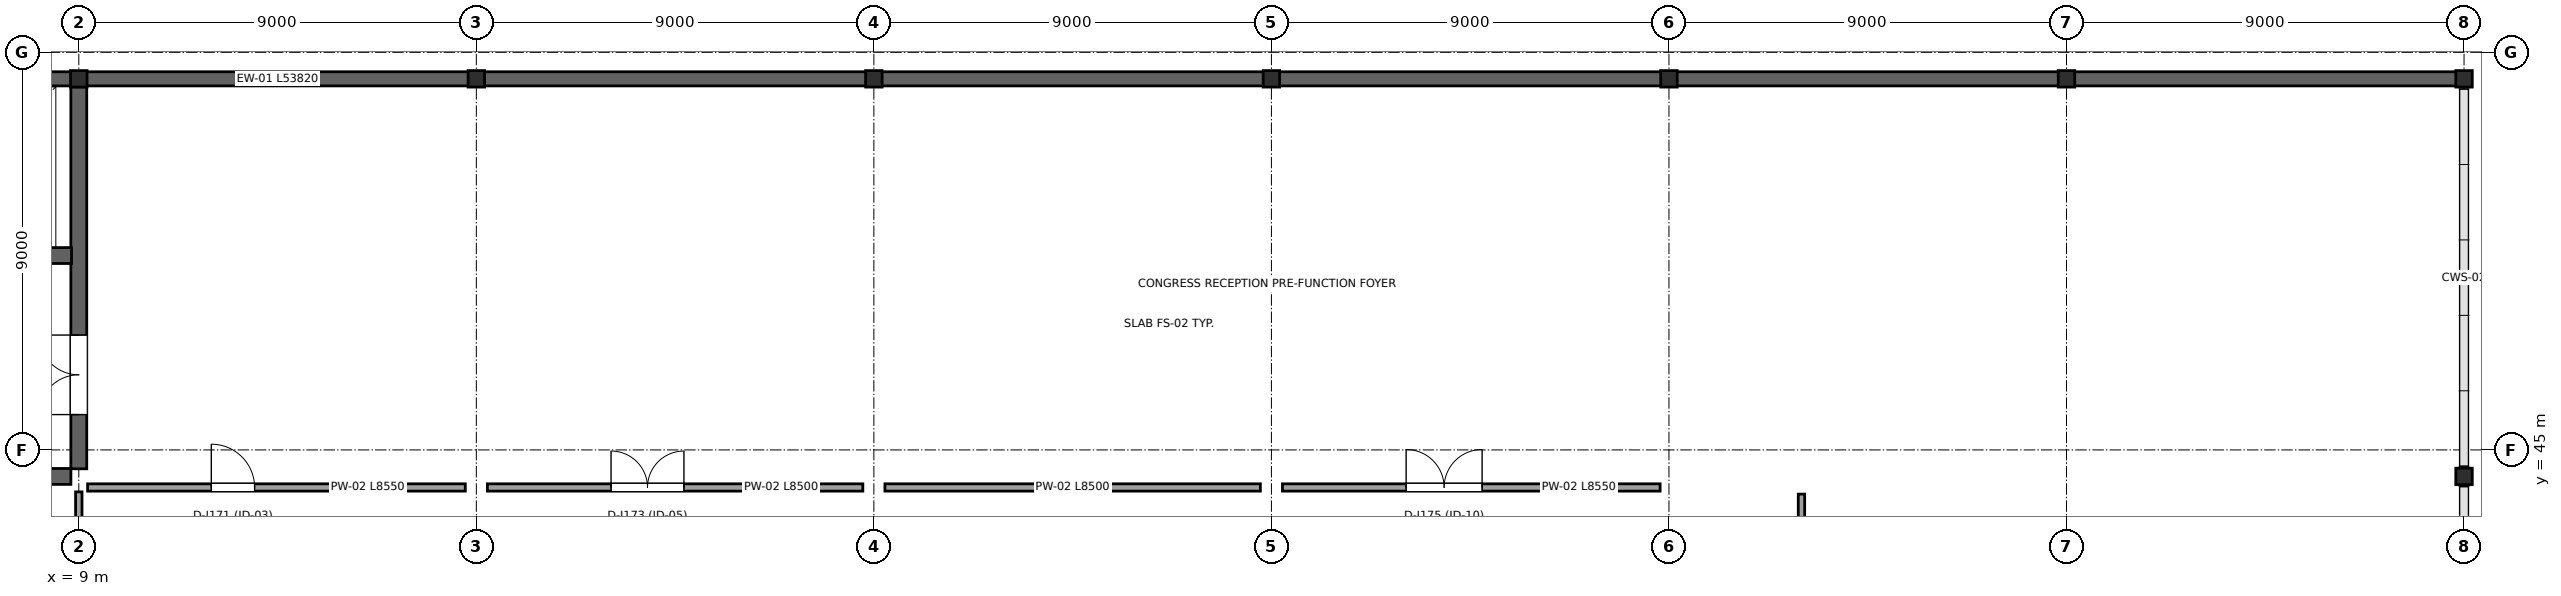
"""IFC4 building model, lengths in metres.
Left out: names, types, materials, properties, quantities, classifications, styles, units other than length and angle.
Written with IfcOpenShell. Run it as: python <this file> out.ifc"""

import sys

from ifc_helpers import new_model, si_unit, direction, frame, frame_2d, origin, origin_2d, place, context, subcontext, project, spatial, rectangle, i_section, extrude, element, fill, save


model = new_model("IFC4")
c1 = context("Model", 3, precision=1e-05, world=origin(), true_north=direction((0.0, 1.0)))
c2 = subcontext(c1, "Body", "Model", "MODEL_VIEW")
j1 = project(units=[si_unit("LENGTHUNIT", "METRE"), si_unit("PLANEANGLEUNIT", "RADIAN")], contexts=[c1])
p1 = place(None, origin())
s1 = spatial("IfcSite", under=j1, at=p1, CompositionType="ELEMENT")
p2 = place(p1, origin())
s2 = spatial("IfcBuilding", under=s1, at=p2, CompositionType="ELEMENT")
p3 = place(p2, frame((0.0, 0.0, 12.0)))
s3 = spatial("IfcBuildingStorey", under=s2, at=p3, CompositionType="ELEMENT", Elevation=12.0)
for number, where, z_axis, x_axis in (
    (1, (63.0, 44.4, 0.0), (0.0, 0.0, 1.0), (1.0, 0.0, 0.0)),
    (2, (63.0, 53.4, 0.0), (0.0, 0.0, 1.0), (1.0, 0.0, 0.0)),
    (3, (54.0, 53.4, 0.0), (0.0, 0.0, 1.0), (1.0, 0.0, 0.0)),
    (4, (45.0, 53.4, 0.0), (0.0, 0.0, 1.0), (1.0, 0.0, 0.0)),
    (5, (36.0, 53.4, 0.0), (0.0, 0.0, 1.0), (1.0, 0.0, 0.0)),
    (6, (27.0, 53.4, 0.0), (0.0, 0.0, 1.0), (1.0, 0.0, 0.0)),
    (7, (18.0, 53.4, 0.0), (0.0, 0.0, 1.0), (1.0, 0.0, 0.0)),
    (8, (9.0, 53.4, 0.0), (0.0, 0.0, 1.0), (1.0, 0.0, 0.0)),
):
    element("IfcColumn", number, at=place(p3, frame(where, z_axis=z_axis, x_axis=x_axis)), inside=s3, PredefinedType="COLUMN", context=c2, shape_type="SweptSolid", body=[
        extrude(i_section(OverallWidth=0.373, OverallDepth=0.373, WebThickness=0.016, FlangeThickness=0.026, at=origin_2d()), origin(), (0.0, 0.0, 1.0), 5.2),
    ])
for number, where, z_axis, x_axis in (
    (9, (0.015, 53.4, 0.0), (0.0, 0.0, 1.0), (1.0, 0.0, 0.0)),
    (10, (9.015, 53.4, 0.0), (0.0, 0.0, 1.0), (1.0, 0.0, 0.0)),
    (11, (18.015, 53.4, 0.0), (0.0, 0.0, 1.0), (1.0, 0.0, 0.0)),
    (12, (27.015, 53.4, 0.0), (0.0, 0.0, 1.0), (1.0, 0.0, 0.0)),
    (13, (36.015, 53.4, 0.0), (0.0, 0.0, 1.0), (1.0, 0.0, 0.0)),
    (14, (45.015, 53.4, 0.0), (0.0, 0.0, 1.0), (1.0, 0.0, 0.0)),
    (15, (54.015, 53.4, 0.0), (0.0, 0.0, 1.0), (1.0, 0.0, 0.0)),
):
    element("IfcWall", number, at=place(p3, frame(where, z_axis=z_axis, x_axis=x_axis)), inside=s3, PredefinedType="STANDARD", context=c2, shape_type="SweptSolid", body=[
        extrude(rectangle(XDim=8.97, YDim=0.32, at=frame_2d((4.485, 0.0))), origin(), (0.0, 0.0, 1.0), 5.05),
    ])
p4 = place(p3, frame((9.0, 44.573, 0.0), z_axis=(0.0, 0.0, 1.0), x_axis=(0.0, 1.0, 0.0)))
e16 = element("IfcWall", 16, at=p4, inside=s3, PredefinedType="SHEAR", context=c2, shape_type="SweptSolid", body=[
    extrude(rectangle(XDim=8.646, YDim=0.36, at=frame_2d((4.323, 0.0))), origin(), (0.0, 0.0, 1.0), 5.05),
])
p5 = place(p4, frame((1.227, 0.0, 0.0)))
e17 = element("IfcOpeningElement", 17, at=p5, cuts=e16, PredefinedType="OPENING", context=c2, shape_type="SweptSolid", body=[
    extrude(rectangle(XDim=1.8, YDim=2.3, at=frame_2d((0.9, 1.15))), frame((0.0, 0.19, 0.0), z_axis=(0.0, -1.0, 0.0), x_axis=(1.0, 0.0, 0.0)), (0.0, 0.0, 1.0), 0.38),
])
p6 = place(p3, frame((0.181, 44.4, 0.0), z_axis=(0.0, 0.0, 1.0), x_axis=(1.0, 0.0, 0.0)))
e18 = element("IfcWall", 18, at=p6, inside=s3, PredefinedType="SHEAR", context=c2, shape_type="SweptSolid", body=[
    extrude(rectangle(XDim=8.64, YDim=0.36, at=frame_2d((4.32, 0.0))), origin(), (0.0, 0.0, 1.0), 5.05),
])
p7 = place(p3, frame((4.615, 49.4, 0.0), z_axis=(0.0, 0.0, 1.0), x_axis=(1.0, 0.0, 0.0)))
e19 = element("IfcWall", 19, at=p7, inside=s3, PredefinedType="SHEAR", context=c2, shape_type="SweptSolid", body=[
    extrude(rectangle(XDim=4.22, YDim=0.36, at=frame_2d((2.11, 0.0))), origin(), (0.0, 0.0, 1.0), 5.05),
])
p8 = place(p7, frame((1.51, 0.0, 0.0)))
e20 = element("IfcOpeningElement", 20, at=p8, cuts=e19, PredefinedType="OPENING", context=c2, shape_type="SweptSolid", body=[
    extrude(rectangle(XDim=1.2, YDim=2.3, at=frame_2d((0.6, 1.15))), frame((0.0, 0.19, 0.0), z_axis=(0.0, -1.0, 0.0), x_axis=(1.0, 0.0, 0.0)), (0.0, 0.0, 1.0), 0.38),
])
p9 = place(p3, frame((48.0, 38.6, 0.0), z_axis=(0.0, 0.0, 1.0), x_axis=(0.0, 1.0, 0.0)))
e21 = element("IfcWall", 21, at=p9, inside=s3, PredefinedType="PARTITIONING", context=c2, shape_type="SweptSolid", body=[
    extrude(rectangle(XDim=5.4, YDim=0.145, at=frame_2d((2.7, 0.0))), origin(), (0.0, 0.0, 1.0), 2.8),
])
p10 = place(p9, frame((1.1, 0.0, 0.0)))
e22 = element("IfcOpeningElement", 22, at=p10, cuts=e21, PredefinedType="OPENING", context=c2, shape_type="SweptSolid", body=[
    extrude(rectangle(XDim=0.98, YDim=2.15, at=frame_2d((0.49, 1.075))), frame((0.0, 0.083, 0.0), z_axis=(0.0, -1.0, 0.0), x_axis=(1.0, 0.0, 0.0)), (0.0, 0.0, 1.0), 0.165),
])
p11 = place(p3, frame((9.2, 44.15, 0.0), z_axis=(0.0, 0.0, 1.0), x_axis=(1.0, 0.0, 0.0)))
e23 = element("IfcWall", 23, at=p11, inside=s3, PredefinedType="PARTITIONING", context=c2, shape_type="SweptSolid", body=[
    extrude(rectangle(XDim=8.55, YDim=0.165, at=frame_2d((4.275, 0.0))), origin(), (0.0, 0.0, 1.0), 2.8),
])
p12 = place(p11, frame((2.8, 0.0, 0.0)))
e24 = element("IfcOpeningElement", 24, at=p12, cuts=e23, PredefinedType="OPENING", context=c2, shape_type="SweptSolid", body=[
    extrude(rectangle(XDim=0.98, YDim=2.15, at=frame_2d((0.49, 1.075))), frame((0.0, 0.093, 0.0), z_axis=(0.0, -1.0, 0.0), x_axis=(1.0, 0.0, 0.0)), (0.0, 0.0, 1.0), 0.185),
])
p13 = place(p3, frame((18.25, 44.15, 0.0), z_axis=(0.0, 0.0, 1.0), x_axis=(1.0, 0.0, 0.0)))
e25 = element("IfcWall", 25, at=p13, inside=s3, PredefinedType="PARTITIONING", context=c2, shape_type="SweptSolid", body=[
    extrude(rectangle(XDim=8.5, YDim=0.165, at=frame_2d((4.25, 0.0))), origin(), (0.0, 0.0, 1.0), 2.8),
])
p14 = place(p13, frame((2.8, 0.0, 0.0)))
e26 = element("IfcOpeningElement", 26, at=p14, cuts=e25, PredefinedType="OPENING", context=c2, shape_type="SweptSolid", body=[
    extrude(rectangle(XDim=1.65, YDim=2.25, at=frame_2d((0.825, 1.125))), frame((0.0, 0.093, 0.0), z_axis=(0.0, -1.0, 0.0), x_axis=(1.0, 0.0, 0.0)), (0.0, 0.0, 1.0), 0.185),
])
p15 = place(p3, frame((27.25, 44.15, 0.0), z_axis=(0.0, 0.0, 1.0), x_axis=(1.0, 0.0, 0.0)))
e27 = element("IfcWall", 27, at=p15, inside=s3, PredefinedType="PARTITIONING", context=c2, shape_type="SweptSolid", body=[
    extrude(rectangle(XDim=8.5, YDim=0.165, at=frame_2d((4.25, 0.0))), origin(), (0.0, 0.0, 1.0), 2.8),
])
p16 = place(p3, frame((36.25, 44.15, 0.0), z_axis=(0.0, 0.0, 1.0), x_axis=(1.0, 0.0, 0.0)))
e28 = element("IfcWall", 28, at=p16, inside=s3, PredefinedType="PARTITIONING", context=c2, shape_type="SweptSolid", body=[
    extrude(rectangle(XDim=8.55, YDim=0.165, at=frame_2d((4.275, 0.0))), origin(), (0.0, 0.0, 1.0), 2.8),
])
p17 = place(p16, frame((2.8, 0.0, 0.0)))
e29 = element("IfcOpeningElement", 29, at=p17, cuts=e28, PredefinedType="OPENING", context=c2, shape_type="SweptSolid", body=[
    extrude(rectangle(XDim=1.72, YDim=2.28, at=frame_2d((0.86, 1.14))), frame((0.0, 0.093, 0.0), z_axis=(0.0, -1.0, 0.0), x_axis=(1.0, 0.0, 0.0)), (0.0, 0.0, 1.0), 0.185),
])
p18 = place(p3, frame((9.0, 9.2, 0.0), z_axis=(0.0, 0.0, 1.0), x_axis=(0.0, 1.0, 0.0)))
e30 = element("IfcWall", 30, at=p18, inside=s3, PredefinedType="PARTITIONING", context=c2, shape_type="SweptSolid", body=[
    extrude(rectangle(XDim=34.85, YDim=0.145, at=frame_2d((17.425, 0.0))), origin(), (0.0, 0.0, 1.0), 2.55),
])
p19 = place(p18, frame((13.0, 0.0, 0.0)))
e31 = element("IfcOpeningElement", 31, at=p19, cuts=e30, PredefinedType="OPENING", context=c2, shape_type="SweptSolid", body=[
    extrude(rectangle(XDim=1.65, YDim=2.25, at=frame_2d((0.825, 1.125))), frame((0.0, 0.083, 0.0), z_axis=(0.0, -1.0, 0.0), x_axis=(1.0, 0.0, 0.0)), (0.0, 0.0, 1.0), 0.165),
])
p20 = place(p18, frame((25.0, 0.0, 0.0)))
e32 = element("IfcOpeningElement", 32, at=p20, cuts=e30, PredefinedType="OPENING", context=c2, shape_type="SweptSolid", body=[
    extrude(rectangle(XDim=1.65, YDim=2.25, at=frame_2d((0.825, 1.125))), frame((0.0, 0.083, 0.0), z_axis=(0.0, -1.0, 0.0), x_axis=(1.0, 0.0, 0.0)), (0.0, 0.0, 1.0), 0.165),
])
p21 = place(p5, origin())
e33 = element("IfcDoor", 33, at=p21, inside=s3, OperationType="DOUBLE_DOOR_SINGLE_SWING", PredefinedType="DOOR", context=c2, shape_type="SweptSolid", body=[
    extrude(rectangle(XDim=1.8, YDim=2.3, at=frame_2d((0.9, 1.15))), frame((0.0, 0.025, 0.0), z_axis=(0.0, -1.0, 0.0), x_axis=(1.0, 0.0, 0.0)), (0.0, 0.0, 1.0), 0.05),
])
fill(e17, e33)
p22 = place(p12, origin())
e34 = element("IfcDoor", 34, at=p22, inside=s3, OperationType="SINGLE_SWING_LEFT", PredefinedType="DOOR", context=c2, shape_type="SweptSolid", body=[
    extrude(rectangle(XDim=0.98, YDim=2.15, at=frame_2d((0.49, 1.075))), frame((0.0, 0.025, 0.0), z_axis=(0.0, -1.0, 0.0), x_axis=(1.0, 0.0, 0.0)), (0.0, 0.0, 1.0), 0.05),
])
fill(e24, e34)
p23 = place(p14, origin())
e35 = element("IfcDoor", 35, at=p23, inside=s3, OperationType="DOUBLE_DOOR_SINGLE_SWING", PredefinedType="DOOR", context=c2, shape_type="SweptSolid", body=[
    extrude(rectangle(XDim=1.65, YDim=2.25, at=frame_2d((0.825, 1.125))), frame((0.0, 0.025, 0.0), z_axis=(0.0, -1.0, 0.0), x_axis=(1.0, 0.0, 0.0)), (0.0, 0.0, 1.0), 0.05),
])
fill(e26, e35)
p24 = place(p17, origin())
e36 = element("IfcDoor", 36, at=p24, inside=s3, OperationType="DOUBLE_DOOR_SINGLE_SWING", PredefinedType="DOOR", context=c2, shape_type="SweptSolid", body=[
    extrude(rectangle(XDim=1.72, YDim=2.28, at=frame_2d((0.86, 1.14))), frame((0.0, 0.025, 0.0), z_axis=(0.0, -1.0, 0.0), x_axis=(1.0, 0.0, 0.0)), (0.0, 0.0, 1.0), 0.05),
])
fill(e29, e36)
save(model, sys.argv[1])
